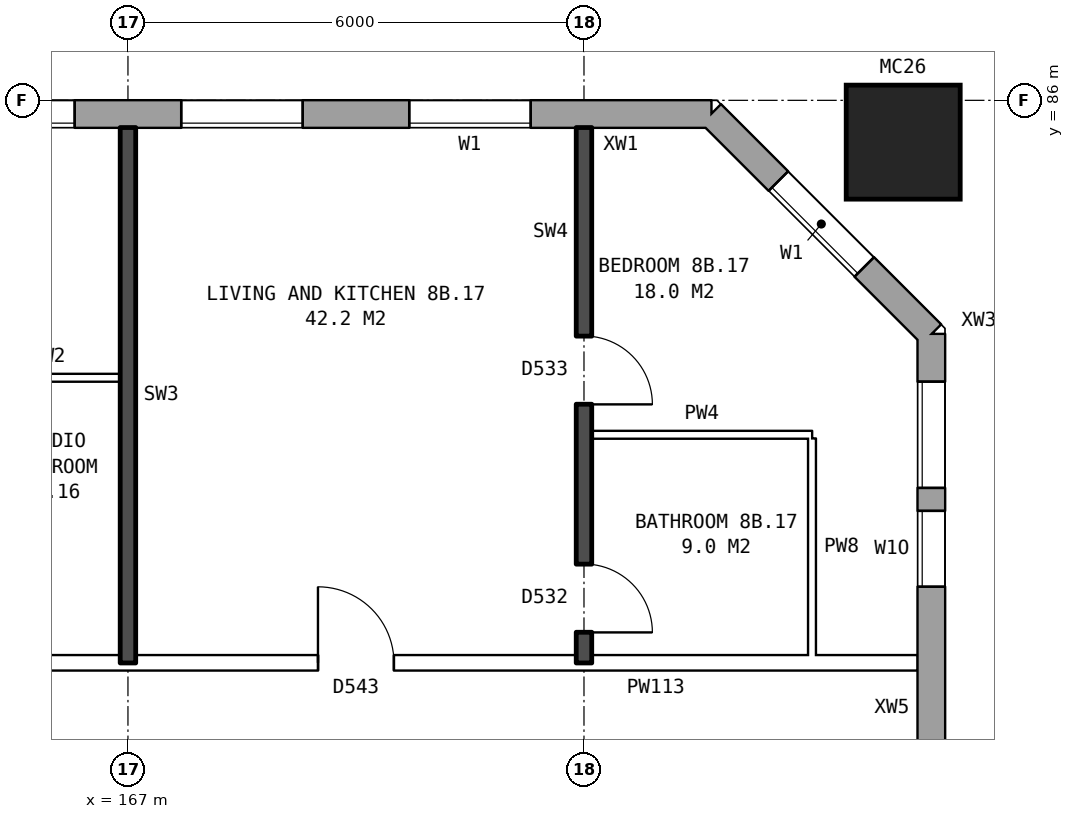
"""IFC4 building model, lengths in metres.
Left out: names, types, materials, properties, quantities, classifications, styles, units other than length and angle.
Written with IfcOpenShell. Run it as: python <this file> out.ifc"""

import sys

from ifc_helpers import new_model, si_unit, direction, frame, frame_2d, origin, origin_2d, place, context, subcontext, project, spatial, rectangle, hollow_rectangle, extrude, element, fill, save


model = new_model("IFC4")
c1 = context("Model", 3, precision=1e-05, world=origin(), true_north=direction((0.0, 1.0)))
c2 = subcontext(c1, "Body", "Model", "MODEL_VIEW")
j1 = project(units=[si_unit("LENGTHUNIT", "METRE"), si_unit("PLANEANGLEUNIT", "RADIAN")], contexts=[c1])
p1 = place(None, origin())
s1 = spatial("IfcSite", under=j1, at=p1, CompositionType="ELEMENT")
p2 = place(p1, origin())
s2 = spatial("IfcBuilding", under=s1, at=p2, CompositionType="ELEMENT")
p3 = place(p2, frame((0.0, 0.0, 31.9)))
s3 = spatial("IfcBuildingStorey", under=s2, at=p3, CompositionType="ELEMENT", Elevation=31.9)
p4 = place(p3, frame((177.2, 85.45, 0.0), z_axis=(0.0, 0.0, 1.0), x_axis=(1.0, 0.0, 0.0)))
e1 = element("IfcColumn", 1, at=p4, inside=s3, PredefinedType="COLUMN", context=c2, shape_type="SweptSolid", body=[
    extrude(hollow_rectangle(XDim=1.5, YDim=1.5, WallThickness=0.08, at=origin_2d()), origin(), (0.0, 0.0, 1.0), 3.1),
])
p5 = place(p3, frame((177.57, 57.075, 0.0), z_axis=(0.0, 0.0, 1.0), x_axis=(0.0, 1.0, 0.0)))
e2 = element("IfcWall", 2, at=p5, inside=s3, PredefinedType="STANDARD", context=c2, shape_type="SweptSolid", body=[
    extrude(rectangle(XDim=25.851, YDim=0.36, at=frame_2d((12.925, 0.0))), origin(), (0.0, 0.0, 1.0), 2.85),
])
p6 = place(p5, frame((0.3, 0.0, 0.8)))
e3 = element("IfcOpeningElement", 3, at=p6, cuts=e2, PredefinedType="OPENING", context=c2, shape_type="SweptSolid", body=[
    extrude(rectangle(XDim=1.4, YDim=1.8, at=frame_2d((0.7, 0.9))), frame((0.0, 0.19, 0.0), z_axis=(0.0, -1.0, 0.0), x_axis=(1.0, 0.0, 0.0)), (0.0, 0.0, 1.0), 0.38),
])
p7 = place(p5, frame((5.575, 0.0, 1.4)))
e4 = element("IfcOpeningElement", 4, at=p7, cuts=e2, PredefinedType="OPENING", context=c2, shape_type="SweptSolid", body=[
    extrude(rectangle(XDim=1.6, YDim=1.2, at=frame_2d((0.8, 0.6))), frame((0.0, 0.19, 0.0), z_axis=(0.0, -1.0, 0.0), x_axis=(1.0, 0.0, 0.0)), (0.0, 0.0, 1.0), 0.38),
])
p8 = place(p5, frame((7.625, 0.0, 0.8)))
e5 = element("IfcOpeningElement", 5, at=p8, cuts=e2, PredefinedType="OPENING", context=c2, shape_type="SweptSolid", body=[
    extrude(rectangle(XDim=1.6, YDim=1.8, at=frame_2d((0.8, 0.9))), frame((0.0, 0.19, 0.0), z_axis=(0.0, -1.0, 0.0), x_axis=(1.0, 0.0, 0.0)), (0.0, 0.0, 1.0), 0.38),
])
p9 = place(p5, frame((10.625, 0.0, 0.8)))
e6 = element("IfcOpeningElement", 6, at=p9, cuts=e2, PredefinedType="OPENING", context=c2, shape_type="SweptSolid", body=[
    extrude(rectangle(XDim=1.6, YDim=1.8, at=frame_2d((0.8, 0.9))), frame((0.0, 0.19, 0.0), z_axis=(0.0, -1.0, 0.0), x_axis=(1.0, 0.0, 0.0)), (0.0, 0.0, 1.0), 0.38),
])
p10 = place(p5, frame((13.625, 0.0, 0.8)))
e7 = element("IfcOpeningElement", 7, at=p10, cuts=e2, PredefinedType="OPENING", context=c2, shape_type="SweptSolid", body=[
    extrude(rectangle(XDim=1.6, YDim=1.8, at=frame_2d((0.8, 0.9))), frame((0.0, 0.19, 0.0), z_axis=(0.0, -1.0, 0.0), x_axis=(1.0, 0.0, 0.0)), (0.0, 0.0, 1.0), 0.38),
])
p11 = place(p5, frame((16.625, 0.0, 0.8)))
e8 = element("IfcOpeningElement", 8, at=p11, cuts=e2, PredefinedType="OPENING", context=c2, shape_type="SweptSolid", body=[
    extrude(rectangle(XDim=1.6, YDim=1.8, at=frame_2d((0.8, 0.9))), frame((0.0, 0.19, 0.0), z_axis=(0.0, -1.0, 0.0), x_axis=(1.0, 0.0, 0.0)), (0.0, 0.0, 1.0), 0.38),
])
p12 = place(p5, frame((9.525, 0.0, 0.8)))
e9 = element("IfcOpeningElement", 9, at=p12, cuts=e2, PredefinedType="OPENING", context=c2, shape_type="SweptSolid", body=[
    extrude(rectangle(XDim=0.8, YDim=1.8, at=frame_2d((0.4, 0.9))), frame((0.0, 0.19, 0.0), z_axis=(0.0, -1.0, 0.0), x_axis=(1.0, 0.0, 0.0)), (0.0, 0.0, 1.0), 0.38),
])
p13 = place(p5, frame((22.525, 0.0, 0.8)))
e10 = element("IfcOpeningElement", 10, at=p13, cuts=e2, PredefinedType="OPENING", context=c2, shape_type="SweptSolid", body=[
    extrude(rectangle(XDim=1.0, YDim=1.2, at=frame_2d((0.5, 0.6))), frame((0.0, 0.19, 0.0), z_axis=(0.0, -1.0, 0.0), x_axis=(1.0, 0.0, 0.0)), (0.0, 0.0, 1.0), 0.38),
])
p14 = place(p5, frame((2.0, 0.0, 0.8)))
e11 = element("IfcOpeningElement", 11, at=p14, cuts=e2, PredefinedType="OPENING", context=c2, shape_type="SweptSolid", body=[
    extrude(rectangle(XDim=0.8, YDim=1.5, at=frame_2d((0.4, 0.75))), frame((0.0, 0.19, 0.0), z_axis=(0.0, -1.0, 0.0), x_axis=(1.0, 0.0, 0.0)), (0.0, 0.0, 1.0), 0.38),
])
p15 = place(p5, frame((12.525, 0.0, 0.8)))
e12 = element("IfcOpeningElement", 12, at=p15, cuts=e2, PredefinedType="OPENING", context=c2, shape_type="SweptSolid", body=[
    extrude(rectangle(XDim=0.8, YDim=1.8, at=frame_2d((0.4, 0.9))), frame((0.0, 0.19, 0.0), z_axis=(0.0, -1.0, 0.0), x_axis=(1.0, 0.0, 0.0)), (0.0, 0.0, 1.0), 0.38),
])
p16 = place(p5, frame((15.525, 0.0, 0.8)))
e13 = element("IfcOpeningElement", 13, at=p16, cuts=e2, PredefinedType="OPENING", context=c2, shape_type="SweptSolid", body=[
    extrude(rectangle(XDim=0.8, YDim=1.8, at=frame_2d((0.4, 0.9))), frame((0.0, 0.19, 0.0), z_axis=(0.0, -1.0, 0.0), x_axis=(1.0, 0.0, 0.0)), (0.0, 0.0, 1.0), 0.38),
])
p17 = place(p5, frame((18.525, 0.0, 0.9)))
e14 = element("IfcOpeningElement", 14, at=p17, cuts=e2, PredefinedType="OPENING", context=c2, shape_type="SweptSolid", body=[
    extrude(rectangle(XDim=0.8, YDim=1.5, at=frame_2d((0.4, 0.75))), frame((0.0, 0.19, 0.0), z_axis=(0.0, -1.0, 0.0), x_axis=(1.0, 0.0, 0.0)), (0.0, 0.0, 1.0), 0.38),
])
p18 = place(p5, frame((23.825, 0.0, 0.8)))
e15 = element("IfcOpeningElement", 15, at=p18, cuts=e2, PredefinedType="OPENING", context=c2, shape_type="SweptSolid", body=[
    extrude(rectangle(XDim=1.4, YDim=1.8, at=frame_2d((0.7, 0.9))), frame((0.0, 0.19, 0.0), z_axis=(0.0, -1.0, 0.0), x_axis=(1.0, 0.0, 0.0)), (0.0, 0.0, 1.0), 0.38),
])
p19 = place(p3, frame((177.57, 82.925, 0.0), z_axis=(0.0, 0.0, 1.0), x_axis=(-0.707106781187, 0.707106781187, 0.0)))
e16 = element("IfcWall", 16, at=p19, inside=s3, PredefinedType="STANDARD", context=c2, shape_type="SweptSolid", body=[
    extrude(rectangle(XDim=4.094, YDim=0.36, at=frame_2d((2.047, 0.0))), origin(), (0.0, 0.0, 1.0), 2.85),
])
p20 = place(p19, frame((1.247, 0.0, 0.8)))
e17 = element("IfcOpeningElement", 17, at=p20, cuts=e16, PredefinedType="OPENING", context=c2, shape_type="SweptSolid", body=[
    extrude(rectangle(XDim=1.6, YDim=1.8, at=frame_2d((0.8, 0.9))), frame((0.0, 0.19, 0.0), z_axis=(0.0, -1.0, 0.0), x_axis=(1.0, 0.0, 0.0)), (0.0, 0.0, 1.0), 0.38),
])
p21 = place(p3, frame((174.675, 85.82, 0.0), z_axis=(0.0, 0.0, 1.0), x_axis=(-1.0, 0.0, 0.0)))
e18 = element("IfcWall", 18, at=p21, inside=s3, PredefinedType="STANDARD", context=c2, shape_type="SweptSolid", body=[
    extrude(rectangle(XDim=40.601, YDim=0.36, at=frame_2d((20.3, 0.0))), origin(), (0.0, 0.0, 1.0), 2.85),
])
p22 = place(p21, frame((2.375, 0.0, 0.8)))
e19 = element("IfcOpeningElement", 19, at=p22, cuts=e18, PredefinedType="OPENING", context=c2, shape_type="SweptSolid", body=[
    extrude(rectangle(XDim=1.6, YDim=1.8, at=frame_2d((0.8, 0.9))), frame((0.0, 0.19, 0.0), z_axis=(0.0, -1.0, 0.0), x_axis=(1.0, 0.0, 0.0)), (0.0, 0.0, 1.0), 0.38),
])
p23 = place(p21, frame((5.375, 0.0, 0.8)))
e20 = element("IfcOpeningElement", 20, at=p23, cuts=e18, PredefinedType="OPENING", context=c2, shape_type="SweptSolid", body=[
    extrude(rectangle(XDim=1.6, YDim=1.8, at=frame_2d((0.8, 0.9))), frame((0.0, 0.19, 0.0), z_axis=(0.0, -1.0, 0.0), x_axis=(1.0, 0.0, 0.0)), (0.0, 0.0, 1.0), 0.38),
])
p24 = place(p21, frame((8.375, 0.0, 0.8)))
e21 = element("IfcOpeningElement", 21, at=p24, cuts=e18, PredefinedType="OPENING", context=c2, shape_type="SweptSolid", body=[
    extrude(rectangle(XDim=1.6, YDim=1.8, at=frame_2d((0.8, 0.9))), frame((0.0, 0.19, 0.0), z_axis=(0.0, -1.0, 0.0), x_axis=(1.0, 0.0, 0.0)), (0.0, 0.0, 1.0), 0.38),
])
p25 = place(p21, frame((11.375, 0.0, 0.8)))
e22 = element("IfcOpeningElement", 22, at=p25, cuts=e18, PredefinedType="OPENING", context=c2, shape_type="SweptSolid", body=[
    extrude(rectangle(XDim=1.6, YDim=1.8, at=frame_2d((0.8, 0.9))), frame((0.0, 0.19, 0.0), z_axis=(0.0, -1.0, 0.0), x_axis=(1.0, 0.0, 0.0)), (0.0, 0.0, 1.0), 0.38),
])
p26 = place(p21, frame((13.875, 0.0, 1.7)))
e23 = element("IfcOpeningElement", 23, at=p26, cuts=e18, PredefinedType="OPENING", context=c2, shape_type="SweptSolid", body=[
    extrude(rectangle(XDim=0.6, YDim=0.9, at=frame_2d((0.3, 0.45))), frame((0.0, 0.19, 0.0), z_axis=(0.0, -1.0, 0.0), x_axis=(1.0, 0.0, 0.0)), (0.0, 0.0, 1.0), 0.38),
])
p27 = place(p21, frame((17.375, 0.0, 0.8)))
e24 = element("IfcOpeningElement", 24, at=p27, cuts=e18, PredefinedType="OPENING", context=c2, shape_type="SweptSolid", body=[
    extrude(rectangle(XDim=1.6, YDim=1.8, at=frame_2d((0.8, 0.9))), frame((0.0, 0.19, 0.0), z_axis=(0.0, -1.0, 0.0), x_axis=(1.0, 0.0, 0.0)), (0.0, 0.0, 1.0), 0.38),
])
p28 = place(p21, frame((20.375, 0.0, 0.8)))
e25 = element("IfcOpeningElement", 25, at=p28, cuts=e18, PredefinedType="OPENING", context=c2, shape_type="SweptSolid", body=[
    extrude(rectangle(XDim=1.6, YDim=1.8, at=frame_2d((0.8, 0.9))), frame((0.0, 0.19, 0.0), z_axis=(0.0, -1.0, 0.0), x_axis=(1.0, 0.0, 0.0)), (0.0, 0.0, 1.0), 0.38),
])
p29 = place(p21, frame((22.825, 0.0, 0.55)))
e26 = element("IfcOpeningElement", 26, at=p29, cuts=e18, PredefinedType="OPENING", context=c2, shape_type="SweptSolid", body=[
    extrude(rectangle(XDim=1.2, YDim=1.8, at=frame_2d((0.6, 0.9))), frame((0.0, 0.19, 0.0), z_axis=(0.0, -1.0, 0.0), x_axis=(1.0, 0.0, 0.0)), (0.0, 0.0, 1.0), 0.38),
])
p30 = place(p21, frame((26.075, 0.0, 1.7)))
e27 = element("IfcOpeningElement", 27, at=p30, cuts=e18, PredefinedType="OPENING", context=c2, shape_type="SweptSolid", body=[
    extrude(rectangle(XDim=0.8, YDim=0.9, at=frame_2d((0.4, 0.45))), frame((0.0, 0.19, 0.0), z_axis=(0.0, -1.0, 0.0), x_axis=(1.0, 0.0, 0.0)), (0.0, 0.0, 1.0), 0.38),
])
p31 = place(p21, frame((29.375, 0.0, 0.8)))
e28 = element("IfcOpeningElement", 28, at=p31, cuts=e18, PredefinedType="OPENING", context=c2, shape_type="SweptSolid", body=[
    extrude(rectangle(XDim=1.6, YDim=1.8, at=frame_2d((0.8, 0.9))), frame((0.0, 0.19, 0.0), z_axis=(0.0, -1.0, 0.0), x_axis=(1.0, 0.0, 0.0)), (0.0, 0.0, 1.0), 0.38),
])
p32 = place(p21, frame((32.375, 0.0, 0.8)))
e29 = element("IfcOpeningElement", 29, at=p32, cuts=e18, PredefinedType="OPENING", context=c2, shape_type="SweptSolid", body=[
    extrude(rectangle(XDim=1.6, YDim=1.8, at=frame_2d((0.8, 0.9))), frame((0.0, 0.19, 0.0), z_axis=(0.0, -1.0, 0.0), x_axis=(1.0, 0.0, 0.0)), (0.0, 0.0, 1.0), 0.38),
])
p33 = place(p21, frame((35.375, 0.0, 0.8)))
e30 = element("IfcOpeningElement", 30, at=p33, cuts=e18, PredefinedType="OPENING", context=c2, shape_type="SweptSolid", body=[
    extrude(rectangle(XDim=1.6, YDim=1.8, at=frame_2d((0.8, 0.9))), frame((0.0, 0.19, 0.0), z_axis=(0.0, -1.0, 0.0), x_axis=(1.0, 0.0, 0.0)), (0.0, 0.0, 1.0), 0.38),
])
p34 = place(p21, frame((38.375, 0.0, 0.8)))
e31 = element("IfcOpeningElement", 31, at=p34, cuts=e18, PredefinedType="OPENING", context=c2, shape_type="SweptSolid", body=[
    extrude(rectangle(XDim=1.6, YDim=1.8, at=frame_2d((0.8, 0.9))), frame((0.0, 0.19, 0.0), z_axis=(0.0, -1.0, 0.0), x_axis=(1.0, 0.0, 0.0)), (0.0, 0.0, 1.0), 0.38),
])
p35 = place(p21, frame((15.775, 0.0, 0.8)))
e32 = element("IfcOpeningElement", 32, at=p35, cuts=e18, PredefinedType="OPENING", context=c2, shape_type="SweptSolid", body=[
    extrude(rectangle(XDim=1.2, YDim=0.9, at=frame_2d((0.6, 0.45))), frame((0.0, 0.19, 0.0), z_axis=(0.0, -1.0, 0.0), x_axis=(1.0, 0.0, 0.0)), (0.0, 0.0, 1.0), 0.38),
])
p36 = place(p21, frame((24.325, 0.0, 0.55)))
e33 = element("IfcOpeningElement", 33, at=p36, cuts=e18, PredefinedType="OPENING", context=c2, shape_type="SweptSolid", body=[
    extrude(rectangle(XDim=0.8, YDim=0.9, at=frame_2d((0.4, 0.45))), frame((0.0, 0.19, 0.0), z_axis=(0.0, -1.0, 0.0), x_axis=(1.0, 0.0, 0.0)), (0.0, 0.0, 1.0), 0.38),
])
p37 = place(p21, frame((27.175, 0.0, 0.8)))
e34 = element("IfcOpeningElement", 34, at=p37, cuts=e18, PredefinedType="OPENING", context=c2, shape_type="SweptSolid", body=[
    extrude(rectangle(XDim=1.2, YDim=1.8, at=frame_2d((0.6, 0.9))), frame((0.0, 0.19, 0.0), z_axis=(0.0, -1.0, 0.0), x_axis=(1.0, 0.0, 0.0)), (0.0, 0.0, 1.0), 0.38),
])
p38 = place(p3, frame((155.1, 78.6, 0.0), z_axis=(0.0, 0.0, 1.0), x_axis=(1.0, 0.0, 0.0)))
e35 = element("IfcWall", 35, at=p38, inside=s3, PredefinedType="PARTITIONING", context=c2, shape_type="SweptSolid", body=[
    extrude(rectangle(XDim=22.29, YDim=0.2, at=frame_2d((11.145, 0.0))), origin(), (0.0, 0.0, 1.0), 2.85),
])
p39 = place(p38, frame((1.45, 0.0, 0.0)))
e36 = element("IfcOpeningElement", 36, at=p39, cuts=e35, PredefinedType="OPENING", context=c2, shape_type="SweptSolid", body=[
    extrude(rectangle(XDim=1.0, YDim=2.1, at=frame_2d((0.5, 1.05))), frame((0.0, 0.11, 0.0), z_axis=(0.0, -1.0, 0.0), x_axis=(1.0, 0.0, 0.0)), (0.0, 0.0, 1.0), 0.22),
])
p40 = place(p38, frame((7.4, 0.0, 0.0)))
e37 = element("IfcOpeningElement", 37, at=p40, cuts=e35, PredefinedType="OPENING", context=c2, shape_type="SweptSolid", body=[
    extrude(rectangle(XDim=1.0, YDim=2.1, at=frame_2d((0.5, 1.05))), frame((0.0, 0.11, 0.0), z_axis=(0.0, -1.0, 0.0), x_axis=(1.0, 0.0, 0.0)), (0.0, 0.0, 1.0), 0.22),
])
p41 = place(p38, frame((14.4, 0.0, 0.0)))
e38 = element("IfcOpeningElement", 38, at=p41, cuts=e35, PredefinedType="OPENING", context=c2, shape_type="SweptSolid", body=[
    extrude(rectangle(XDim=1.0, YDim=2.1, at=frame_2d((0.5, 1.05))), frame((0.0, 0.11, 0.0), z_axis=(0.0, -1.0, 0.0), x_axis=(1.0, 0.0, 0.0)), (0.0, 0.0, 1.0), 0.22),
])
p42 = place(p3, frame((173.1, 81.6, 0.0), z_axis=(0.0, 0.0, 1.0), x_axis=(1.0, 0.0, 0.0)))
e39 = element("IfcWall", 39, at=p42, inside=s3, PredefinedType="PARTITIONING", context=c2, shape_type="SweptSolid", body=[
    extrude(rectangle(XDim=2.9, YDim=0.1, at=frame_2d((1.45, 0.0))), origin(), (0.0, 0.0, 1.0), 2.85),
])
p43 = place(p3, frame((165.0, 82.35, 0.0), z_axis=(0.0, 0.0, 1.0), x_axis=(1.0, 0.0, 0.0)))
e40 = element("IfcWall", 40, at=p43, inside=s3, PredefinedType="PARTITIONING", context=c2, shape_type="SweptSolid", body=[
    extrude(rectangle(XDim=1.9, YDim=0.1, at=frame_2d((0.95, 0.0))), origin(), (0.0, 0.0, 1.0), 2.85),
])
p44 = place(p3, frame((167.0, 78.6, 0.0), z_axis=(0.0, 0.0, 1.0), x_axis=(0.0, 1.0, 0.0)))
e41 = element("IfcWall", 41, at=p44, inside=s3, PredefinedType="SOLIDWALL", context=c2, shape_type="SweptSolid", body=[
    extrude(rectangle(XDim=7.04, YDim=0.2, at=frame_2d((3.52, 0.0))), origin(), (0.0, 0.0, 1.0), 2.85),
])
p45 = place(p3, frame((173.0, 78.6, 0.0), z_axis=(0.0, 0.0, 1.0), x_axis=(0.0, 1.0, 0.0)))
e42 = element("IfcWall", 42, at=p45, inside=s3, PredefinedType="SOLIDWALL", context=c2, shape_type="SweptSolid", body=[
    extrude(rectangle(XDim=7.04, YDim=0.2, at=frame_2d((3.52, 0.0))), origin(), (0.0, 0.0, 1.0), 2.85),
])
p46 = place(p45, frame((3.4, 0.0, 0.0)))
e43 = element("IfcOpeningElement", 43, at=p46, cuts=e42, PredefinedType="OPENING", context=c2, shape_type="SweptSolid", body=[
    extrude(rectangle(XDim=0.9, YDim=2.1, at=frame_2d((0.45, 1.05))), frame((0.0, 0.11, 0.0), z_axis=(0.0, -1.0, 0.0), x_axis=(1.0, 0.0, 0.0)), (0.0, 0.0, 1.0), 0.22),
])
p47 = place(p45, frame((0.4, 0.0, 0.0)))
e44 = element("IfcOpeningElement", 44, at=p47, cuts=e42, PredefinedType="OPENING", context=c2, shape_type="SweptSolid", body=[
    extrude(rectangle(XDim=0.9, YDim=2.1, at=frame_2d((0.45, 1.05))), frame((0.0, 0.11, 0.0), z_axis=(0.0, -1.0, 0.0), x_axis=(1.0, 0.0, 0.0)), (0.0, 0.0, 1.0), 0.22),
])
p48 = place(p3, frame((176.0, 78.7, 0.0), z_axis=(0.0, 0.0, 1.0), x_axis=(0.0, 1.0, 0.0)))
e45 = element("IfcWall", 45, at=p48, inside=s3, PredefinedType="PARTITIONING", context=c2, shape_type="SweptSolid", body=[
    extrude(rectangle(XDim=2.85, YDim=0.1, at=frame_2d((1.425, 0.0))), origin(), (0.0, 0.0, 1.0), 2.85),
])
p49 = place(p13, origin())
e46 = element("IfcWindow", 46, at=p49, inside=s3, PartitioningType="SINGLE_PANEL", PredefinedType="WINDOW", context=c2, shape_type="SweptSolid", body=[
    extrude(rectangle(XDim=1.0, YDim=1.2, at=frame_2d((0.5, 0.6))), frame((0.0, 0.15, 0.0), z_axis=(0.0, -1.0, 0.0), x_axis=(1.0, 0.0, 0.0)), (0.0, 0.0, 1.0), 0.06),
])
fill(e10, e46)
p50 = place(p20, origin())
e47 = element("IfcWindow", 47, at=p50, inside=s3, PartitioningType="SINGLE_PANEL", PredefinedType="WINDOW", context=c2, shape_type="SweptSolid", body=[
    extrude(rectangle(XDim=1.6, YDim=1.8, at=frame_2d((0.8, 0.9))), frame((0.0, 0.15, 0.0), z_axis=(0.0, -1.0, 0.0), x_axis=(1.0, 0.0, 0.0)), (0.0, 0.0, 1.0), 0.06),
])
fill(e17, e47)
p51 = place(p22, origin())
e48 = element("IfcWindow", 48, at=p51, inside=s3, PartitioningType="SINGLE_PANEL", PredefinedType="WINDOW", context=c2, shape_type="SweptSolid", body=[
    extrude(rectangle(XDim=1.6, YDim=1.8, at=frame_2d((0.8, 0.9))), frame((0.0, 0.15, 0.0), z_axis=(0.0, -1.0, 0.0), x_axis=(1.0, 0.0, 0.0)), (0.0, 0.0, 1.0), 0.06),
])
fill(e19, e48)
p52 = place(p23, origin())
e49 = element("IfcWindow", 49, at=p52, inside=s3, PartitioningType="SINGLE_PANEL", PredefinedType="WINDOW", context=c2, shape_type="SweptSolid", body=[
    extrude(rectangle(XDim=1.6, YDim=1.8, at=frame_2d((0.8, 0.9))), frame((0.0, 0.15, 0.0), z_axis=(0.0, -1.0, 0.0), x_axis=(1.0, 0.0, 0.0)), (0.0, 0.0, 1.0), 0.06),
])
fill(e20, e49)
p53 = place(p24, origin())
e50 = element("IfcWindow", 50, at=p53, inside=s3, PartitioningType="SINGLE_PANEL", PredefinedType="WINDOW", context=c2, shape_type="SweptSolid", body=[
    extrude(rectangle(XDim=1.6, YDim=1.8, at=frame_2d((0.8, 0.9))), frame((0.0, 0.15, 0.0), z_axis=(0.0, -1.0, 0.0), x_axis=(1.0, 0.0, 0.0)), (0.0, 0.0, 1.0), 0.06),
])
fill(e21, e50)
p54 = place(p46, frame((0.9, 0.0, 0.0), z_axis=(0.0, 0.0, 1.0), x_axis=(-1.0, 0.0, 0.0)))
e51 = element("IfcDoor", 51, at=p54, inside=s3, OperationType="SINGLE_SWING_RIGHT", PredefinedType="DOOR", context=c2, shape_type="SweptSolid", body=[
    extrude(rectangle(XDim=0.9, YDim=2.1, at=frame_2d((0.45, 1.05))), frame((0.0, 0.025, 0.0), z_axis=(0.0, -1.0, 0.0), x_axis=(1.0, 0.0, 0.0)), (0.0, 0.0, 1.0), 0.05),
])
fill(e43, e51)
p55 = place(p41, origin())
e52 = element("IfcDoor", 52, at=p55, inside=s3, OperationType="SINGLE_SWING_LEFT", PredefinedType="DOOR", context=c2, shape_type="SweptSolid", body=[
    extrude(rectangle(XDim=1.0, YDim=2.1, at=frame_2d((0.5, 1.05))), frame((0.0, 0.025, 0.0), z_axis=(0.0, -1.0, 0.0), x_axis=(1.0, 0.0, 0.0)), (0.0, 0.0, 1.0), 0.05),
])
fill(e38, e52)
p56 = place(p47, frame((0.9, 0.0, 0.0), z_axis=(0.0, 0.0, 1.0), x_axis=(-1.0, 0.0, 0.0)))
e53 = element("IfcDoor", 53, at=p56, inside=s3, OperationType="SINGLE_SWING_RIGHT", PredefinedType="DOOR", context=c2, shape_type="SweptSolid", body=[
    extrude(rectangle(XDim=0.9, YDim=2.1, at=frame_2d((0.45, 1.05))), frame((0.0, 0.025, 0.0), z_axis=(0.0, -1.0, 0.0), x_axis=(1.0, 0.0, 0.0)), (0.0, 0.0, 1.0), 0.05),
])
fill(e44, e53)
p57 = place(p18, origin())
e54 = element("IfcWindow", 54, at=p57, inside=s3, PartitioningType="SINGLE_PANEL", PredefinedType="WINDOW", context=c2, shape_type="SweptSolid", body=[
    extrude(rectangle(XDim=1.4, YDim=1.8, at=frame_2d((0.7, 0.9))), frame((0.0, 0.15, 0.0), z_axis=(0.0, -1.0, 0.0), x_axis=(1.0, 0.0, 0.0)), (0.0, 0.0, 1.0), 0.06),
])
fill(e15, e54)
save(model, sys.argv[1])
